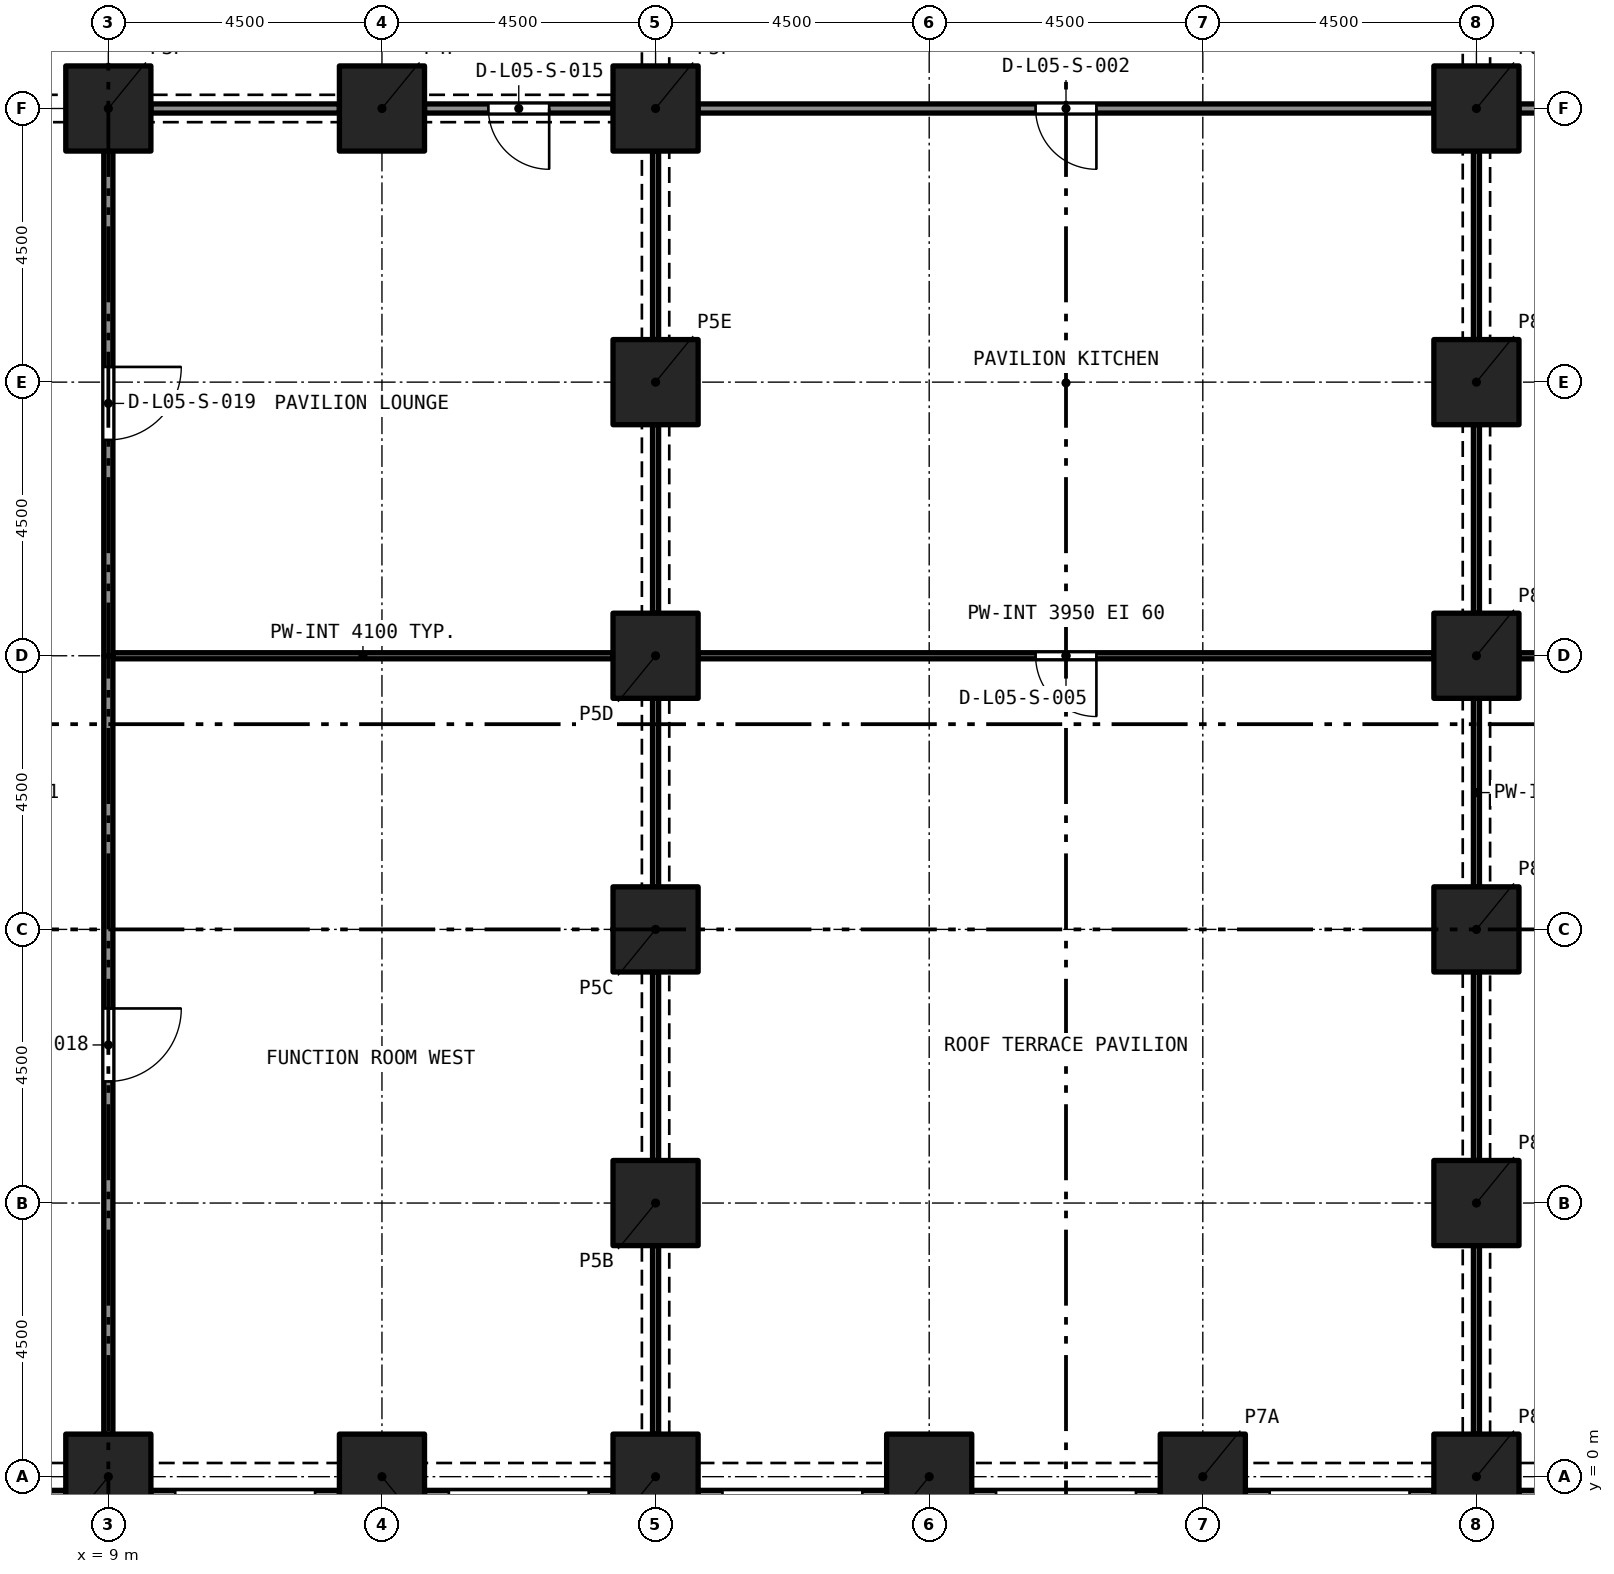
"""IFC4 building model, lengths in metres.
Left out: names, types, materials, properties, quantities, classifications, styles, units other than length and angle.
Written with IfcOpenShell. Run it as: python <this file> out.ifc"""

import sys

from ifc_helpers import new_model, si_unit, direction, frame, frame_2d, origin, origin_2d, place, context, subcontext, project, spatial, rectangle, extrude, element, fill, save


model = new_model("IFC4")
c1 = context("Model", 3, precision=1e-05, world=origin(), true_north=direction((0.0, 1.0)))
c2 = subcontext(c1, "Body", "Model", "MODEL_VIEW")
j1 = project(units=[si_unit("LENGTHUNIT", "METRE"), si_unit("PLANEANGLEUNIT", "RADIAN")], contexts=[c1])
p1 = place(None, origin())
s1 = spatial("IfcSite", under=j1, at=p1, CompositionType="ELEMENT")
p2 = place(p1, origin())
s2 = spatial("IfcBuilding", under=s1, at=p2, CompositionType="ELEMENT")
p3 = place(p2, frame((0.0, 0.0, 26.0)))
s3 = spatial("IfcBuildingStorey", under=s2, at=p3, CompositionType="ELEMENT", Elevation=26.0)
for number, where, z_axis, x_axis in (
    (1, (9.0, 0.0, 0.0), (0.0, 0.0, 1.0), (1.0, 0.0, 0.0)),
    (2, (13.5, 0.0, 0.0), (0.0, 0.0, 1.0), (1.0, 0.0, 0.0)),
    (3, (18.0, 0.0, 0.0), (0.0, 0.0, 1.0), (1.0, 0.0, 0.0)),
    (4, (22.5, 0.0, 0.0), (0.0, 0.0, 1.0), (1.0, 0.0, 0.0)),
    (5, (27.0, 0.0, 0.0), (0.0, 0.0, 1.0), (1.0, 0.0, 0.0)),
    (6, (31.5, 0.0, 0.0), (0.0, 0.0, 1.0), (1.0, 0.0, 0.0)),
    (7, (18.0, 4.5, 0.0), (0.0, 0.0, 1.0), (1.0, 0.0, 0.0)),
    (8, (31.5, 4.5, 0.0), (0.0, 0.0, 1.0), (1.0, 0.0, 0.0)),
    (9, (18.0, 9.0, 0.0), (0.0, 0.0, 1.0), (1.0, 0.0, 0.0)),
    (10, (31.5, 9.0, 0.0), (0.0, 0.0, 1.0), (1.0, 0.0, 0.0)),
    (11, (18.0, 13.5, 0.0), (0.0, 0.0, 1.0), (1.0, 0.0, 0.0)),
    (12, (31.5, 13.5, 0.0), (0.0, 0.0, 1.0), (1.0, 0.0, 0.0)),
    (13, (18.0, 18.0, 0.0), (0.0, 0.0, 1.0), (1.0, 0.0, 0.0)),
    (14, (31.5, 18.0, 0.0), (0.0, 0.0, 1.0), (1.0, 0.0, 0.0)),
    (15, (9.0, 22.5, 0.0), (0.0, 0.0, 1.0), (1.0, 0.0, 0.0)),
    (16, (13.5, 22.5, 0.0), (0.0, 0.0, 1.0), (1.0, 0.0, 0.0)),
    (17, (18.0, 22.5, 0.0), (0.0, 0.0, 1.0), (1.0, 0.0, 0.0)),
    (18, (31.5, 22.5, 0.0), (0.0, 0.0, 1.0), (1.0, 0.0, 0.0)),
):
    element("IfcColumn", number, at=place(p3, frame(where, z_axis=z_axis, x_axis=x_axis)), inside=s3, PredefinedType="COLUMN", context=c2, shape_type="SweptSolid", body=[
        extrude(rectangle(XDim=1.4, YDim=1.4, at=origin_2d()), origin(), (0.0, 0.0, 1.0), 4.4),
    ])
p4 = place(p3, frame((8.3, -0.375, 0.0), z_axis=(0.0, 0.0, 1.0), x_axis=(-1.0, 0.0, 0.0)))
e19 = element("IfcWall", 19, at=p4, inside=s3, PredefinedType="SOLIDWALL", context=c2, shape_type="SweptSolid", body=[
    extrude(rectangle(XDim=3.1, YDim=0.3, at=frame_2d((1.55, 0.0))), origin(), (0.0, 0.0, 1.0), 4.4),
])
p5 = place(p4, frame((0.4, 0.0, 0.45)))
e20 = element("IfcOpeningElement", 20, at=p5, cuts=e19, PredefinedType="OPENING", context=c2, shape_type="SweptSolid", body=[
    extrude(rectangle(XDim=2.3, YDim=2.55, at=frame_2d((1.15, 1.275))), frame((0.0, 0.16, 0.0), z_axis=(0.0, -1.0, 0.0), x_axis=(1.0, 0.0, 0.0)), (0.0, 0.0, 1.0), 0.32),
])
p6 = place(p3, frame((12.8, -0.375, 0.0), z_axis=(0.0, 0.0, 1.0), x_axis=(-1.0, 0.0, 0.0)))
e21 = element("IfcWall", 21, at=p6, inside=s3, PredefinedType="SOLIDWALL", context=c2, shape_type="SweptSolid", body=[
    extrude(rectangle(XDim=3.1, YDim=0.3, at=frame_2d((1.55, 0.0))), origin(), (0.0, 0.0, 1.0), 4.4),
])
p7 = place(p6, frame((0.4, 0.0, 0.45)))
e22 = element("IfcOpeningElement", 22, at=p7, cuts=e21, PredefinedType="OPENING", context=c2, shape_type="SweptSolid", body=[
    extrude(rectangle(XDim=2.3, YDim=2.55, at=frame_2d((1.15, 1.275))), frame((0.0, 0.16, 0.0), z_axis=(0.0, -1.0, 0.0), x_axis=(1.0, 0.0, 0.0)), (0.0, 0.0, 1.0), 0.32),
])
p8 = place(p3, frame((17.3, -0.375, 0.0), z_axis=(0.0, 0.0, 1.0), x_axis=(-1.0, 0.0, 0.0)))
e23 = element("IfcWall", 23, at=p8, inside=s3, PredefinedType="SOLIDWALL", context=c2, shape_type="SweptSolid", body=[
    extrude(rectangle(XDim=3.1, YDim=0.3, at=frame_2d((1.55, 0.0))), origin(), (0.0, 0.0, 1.0), 4.4),
])
p9 = place(p8, frame((0.4, 0.0, 0.45)))
e24 = element("IfcOpeningElement", 24, at=p9, cuts=e23, PredefinedType="OPENING", context=c2, shape_type="SweptSolid", body=[
    extrude(rectangle(XDim=2.3, YDim=2.55, at=frame_2d((1.15, 1.275))), frame((0.0, 0.16, 0.0), z_axis=(0.0, -1.0, 0.0), x_axis=(1.0, 0.0, 0.0)), (0.0, 0.0, 1.0), 0.32),
])
p10 = place(p3, frame((21.8, -0.375, 0.0), z_axis=(0.0, 0.0, 1.0), x_axis=(-1.0, 0.0, 0.0)))
e25 = element("IfcWall", 25, at=p10, inside=s3, PredefinedType="SOLIDWALL", context=c2, shape_type="SweptSolid", body=[
    extrude(rectangle(XDim=3.1, YDim=0.3, at=frame_2d((1.55, 0.0))), origin(), (0.0, 0.0, 1.0), 4.4),
])
p11 = place(p10, frame((0.4, 0.0, 0.45)))
e26 = element("IfcOpeningElement", 26, at=p11, cuts=e25, PredefinedType="OPENING", context=c2, shape_type="SweptSolid", body=[
    extrude(rectangle(XDim=2.3, YDim=2.55, at=frame_2d((1.15, 1.275))), frame((0.0, 0.16, 0.0), z_axis=(0.0, -1.0, 0.0), x_axis=(1.0, 0.0, 0.0)), (0.0, 0.0, 1.0), 0.32),
])
p12 = place(p3, frame((26.3, -0.375, 0.0), z_axis=(0.0, 0.0, 1.0), x_axis=(-1.0, 0.0, 0.0)))
e27 = element("IfcWall", 27, at=p12, inside=s3, PredefinedType="SOLIDWALL", context=c2, shape_type="SweptSolid", body=[
    extrude(rectangle(XDim=3.1, YDim=0.3, at=frame_2d((1.55, 0.0))), origin(), (0.0, 0.0, 1.0), 4.4),
])
p13 = place(p12, frame((0.4, 0.0, 0.45)))
e28 = element("IfcOpeningElement", 28, at=p13, cuts=e27, PredefinedType="OPENING", context=c2, shape_type="SweptSolid", body=[
    extrude(rectangle(XDim=2.3, YDim=2.55, at=frame_2d((1.15, 1.275))), frame((0.0, 0.16, 0.0), z_axis=(0.0, -1.0, 0.0), x_axis=(1.0, 0.0, 0.0)), (0.0, 0.0, 1.0), 0.32),
])
p14 = place(p3, frame((30.8, -0.375, 0.0), z_axis=(0.0, 0.0, 1.0), x_axis=(-1.0, 0.0, 0.0)))
e29 = element("IfcWall", 29, at=p14, inside=s3, PredefinedType="SOLIDWALL", context=c2, shape_type="SweptSolid", body=[
    extrude(rectangle(XDim=3.1, YDim=0.3, at=frame_2d((1.55, 0.0))), origin(), (0.0, 0.0, 1.0), 4.4),
])
p15 = place(p14, frame((0.4, 0.0, 0.45)))
e30 = element("IfcOpeningElement", 30, at=p15, cuts=e29, PredefinedType="OPENING", context=c2, shape_type="SweptSolid", body=[
    extrude(rectangle(XDim=2.3, YDim=2.55, at=frame_2d((1.15, 1.275))), frame((0.0, 0.16, 0.0), z_axis=(0.0, -1.0, 0.0), x_axis=(1.0, 0.0, 0.0)), (0.0, 0.0, 1.0), 0.32),
])
p16 = place(p3, frame((35.3, -0.375, 0.0), z_axis=(0.0, 0.0, 1.0), x_axis=(-1.0, 0.0, 0.0)))
e31 = element("IfcWall", 31, at=p16, inside=s3, PredefinedType="SOLIDWALL", context=c2, shape_type="SweptSolid", body=[
    extrude(rectangle(XDim=3.1, YDim=0.3, at=frame_2d((1.55, 0.0))), origin(), (0.0, 0.0, 1.0), 4.4),
])
p17 = place(p16, frame((0.4, 0.0, 0.45)))
e32 = element("IfcOpeningElement", 32, at=p17, cuts=e31, PredefinedType="OPENING", context=c2, shape_type="SweptSolid", body=[
    extrude(rectangle(XDim=2.3, YDim=2.55, at=frame_2d((1.15, 1.275))), frame((0.0, 0.16, 0.0), z_axis=(0.0, -1.0, 0.0), x_axis=(1.0, 0.0, 0.0)), (0.0, 0.0, 1.0), 0.32),
])
p18 = place(p3, frame((30.8, 22.5, 0.0), z_axis=(0.0, 0.0, 1.0), x_axis=(-1.0, 0.0, 0.0)))
e33 = element("IfcWall", 33, at=p18, inside=s3, PredefinedType="PARTITIONING", context=c2, shape_type="SweptSolid", body=[
    extrude(rectangle(XDim=12.1, YDim=0.15, at=frame_2d((6.05, 0.0))), origin(), (0.0, 0.0, 1.0), 3.95),
])
p19 = place(p18, frame((5.55, 0.0, 0.0)))
e34 = element("IfcOpeningElement", 34, at=p19, cuts=e33, PredefinedType="OPENING", context=c2, shape_type="SweptSolid", body=[
    extrude(rectangle(XDim=1.0, YDim=2.1, at=frame_2d((0.5, 1.05))), frame((0.0, 0.085, 0.0), z_axis=(0.0, -1.0, 0.0), x_axis=(1.0, 0.0, 0.0)), (0.0, 0.0, 1.0), 0.17),
])
p20 = place(p3, frame((30.8, 13.5, 0.0), z_axis=(0.0, 0.0, 1.0), x_axis=(-1.0, 0.0, 0.0)))
e35 = element("IfcWall", 35, at=p20, inside=s3, PredefinedType="PARTITIONING", context=c2, shape_type="SweptSolid", body=[
    extrude(rectangle(XDim=12.1, YDim=0.1, at=frame_2d((6.05, 0.0))), origin(), (0.0, 0.0, 1.0), 3.95),
])
p21 = place(p20, frame((5.55, 0.0, 0.0)))
e36 = element("IfcOpeningElement", 36, at=p21, cuts=e35, PredefinedType="OPENING", context=c2, shape_type="SweptSolid", body=[
    extrude(rectangle(XDim=1.0, YDim=2.1, at=frame_2d((0.5, 1.05))), frame((0.0, 0.06, 0.0), z_axis=(0.0, -1.0, 0.0), x_axis=(1.0, 0.0, 0.0)), (0.0, 0.0, 1.0), 0.12),
])
for number, where, z_axis, x_axis in (
    (37, (31.5, 9.7, 0.0), (0.0, 0.0, 1.0), (0.0, 1.0, 0.0)),
    (38, (31.5, 5.2, 0.0), (0.0, 0.0, 1.0), (0.0, 1.0, 0.0)),
    (39, (31.5, 0.7, 0.0), (0.0, 0.0, 1.0), (0.0, 1.0, 0.0)),
    (40, (18.0, 0.7, 0.0), (0.0, 0.0, 1.0), (0.0, 1.0, 0.0)),
    (41, (18.0, 5.2, 0.0), (0.0, 0.0, 1.0), (0.0, 1.0, 0.0)),
    (42, (18.0, 9.7, 0.0), (0.0, 0.0, 1.0), (0.0, 1.0, 0.0)),
    (43, (31.5, 18.7, 0.0), (0.0, 0.0, 1.0), (0.0, 1.0, 0.0)),
    (44, (31.5, 14.2, 0.0), (0.0, 0.0, 1.0), (0.0, 1.0, 0.0)),
    (45, (18.0, 14.2, 0.0), (0.0, 0.0, 1.0), (0.0, 1.0, 0.0)),
    (46, (18.0, 18.7, 0.0), (0.0, 0.0, 1.0), (0.0, 1.0, 0.0)),
):
    element("IfcWall", number, at=place(p3, frame(where, z_axis=z_axis, x_axis=x_axis)), inside=s3, PredefinedType="PARTITIONING", context=c2, shape_type="SweptSolid", body=[
        extrude(rectangle(XDim=3.1, YDim=0.1, at=frame_2d((1.55, 0.0))), origin(), (0.0, 0.0, 1.0), 3.58),
    ])
p22 = place(p3, frame((40.575, 22.5, 0.0), z_axis=(0.0, 0.0, 1.0), x_axis=(-1.0, 0.0, 0.0)))
e47 = element("IfcWall", 47, at=p22, inside=s3, PredefinedType="PARTITIONING", context=c2, shape_type="SweptSolid", body=[
    extrude(rectangle(XDim=8.375, YDim=0.15, at=frame_2d((4.188, 0.0))), origin(), (0.0, 0.0, 1.0), 4.1),
])
p23 = place(p22, frame((3.725, 0.0, 0.0)))
e48 = element("IfcOpeningElement", 48, at=p23, cuts=e47, PredefinedType="OPENING", context=c2, shape_type="SweptSolid", body=[
    extrude(rectangle(XDim=1.0, YDim=2.1, at=frame_2d((0.5, 1.05))), frame((0.0, 0.085, 0.0), z_axis=(0.0, -1.0, 0.0), x_axis=(1.0, 0.0, 0.0)), (0.0, 0.0, 1.0), 0.17),
])
p24 = place(p3, frame((32.2, 13.5, 0.0), z_axis=(0.0, 0.0, 1.0), x_axis=(1.0, 0.0, 0.0)))
e49 = element("IfcWall", 49, at=p24, inside=s3, PredefinedType="PARTITIONING", context=c2, shape_type="SweptSolid", body=[
    extrude(rectangle(XDim=8.225, YDim=0.1, at=frame_2d((4.113, 0.0))), origin(), (0.0, 0.0, 1.0), 4.1),
])
p25 = place(p3, frame((17.3, 22.5, 0.0), z_axis=(0.0, 0.0, 1.0), x_axis=(-1.0, 0.0, 0.0)))
e50 = element("IfcWall", 50, at=p25, inside=s3, PredefinedType="PARTITIONING", context=c2, shape_type="SweptSolid", body=[
    extrude(rectangle(XDim=3.1, YDim=0.15, at=frame_2d((1.55, 0.0))), origin(), (0.0, 0.0, 1.0), 3.58),
])
p26 = place(p25, frame((1.05, 0.0, 0.0)))
e51 = element("IfcOpeningElement", 51, at=p26, cuts=e50, PredefinedType="OPENING", context=c2, shape_type="SweptSolid", body=[
    extrude(rectangle(XDim=1.0, YDim=2.1, at=frame_2d((0.5, 1.05))), frame((0.0, 0.085, 0.0), z_axis=(0.0, -1.0, 0.0), x_axis=(1.0, 0.0, 0.0)), (0.0, 0.0, 1.0), 0.17),
])
p27 = place(p3, frame((9.7, 22.5, 0.0), z_axis=(0.0, 0.0, 1.0), x_axis=(1.0, 0.0, 0.0)))
e52 = element("IfcWall", 52, at=p27, inside=s3, PredefinedType="PARTITIONING", context=c2, shape_type="SweptSolid", body=[
    extrude(rectangle(XDim=3.1, YDim=0.15, at=frame_2d((1.55, 0.0))), origin(), (0.0, 0.0, 1.0), 3.58),
])
p28 = place(p3, frame((9.075, 13.5, 0.0), z_axis=(0.0, 0.0, 1.0), x_axis=(1.0, 0.0, 0.0)))
e53 = element("IfcWall", 53, at=p28, inside=s3, PredefinedType="PARTITIONING", context=c2, shape_type="SweptSolid", body=[
    extrude(rectangle(XDim=8.225, YDim=0.1, at=frame_2d((4.113, 0.0))), origin(), (0.0, 0.0, 1.0), 4.1),
])
p29 = place(p3, frame((9.0, 13.5, 0.0), z_axis=(0.0, 0.0, 1.0), x_axis=(0.0, -1.0, 0.0)))
e54 = element("IfcWall", 54, at=p29, inside=s3, PredefinedType="PARTITIONING", context=c2, shape_type="SweptSolid", body=[
    extrude(rectangle(XDim=12.8, YDim=0.15, at=frame_2d((6.4, 0.0))), origin(), (0.0, 0.0, 1.0), 4.1),
])
p30 = place(p29, frame((5.8, 0.0, 0.0)))
e55 = element("IfcOpeningElement", 55, at=p30, cuts=e54, PredefinedType="OPENING", context=c2, shape_type="SweptSolid", body=[
    extrude(rectangle(XDim=1.2, YDim=2.1, at=frame_2d((0.6, 1.05))), frame((0.0, 0.085, 0.0), z_axis=(0.0, -1.0, 0.0), x_axis=(1.0, 0.0, 0.0)), (0.0, 0.0, 1.0), 0.17),
])
p31 = place(p3, frame((9.0, 21.8, 0.0), z_axis=(0.0, 0.0, 1.0), x_axis=(0.0, -1.0, 0.0)))
e56 = element("IfcWall", 56, at=p31, inside=s3, PredefinedType="PARTITIONING", context=c2, shape_type="SweptSolid", body=[
    extrude(rectangle(XDim=8.3, YDim=0.15, at=frame_2d((4.15, 0.0))), origin(), (0.0, 0.0, 1.0), 4.1),
])
p32 = place(p31, frame((3.55, 0.0, 0.0)))
e57 = element("IfcOpeningElement", 57, at=p32, cuts=e56, PredefinedType="OPENING", context=c2, shape_type="SweptSolid", body=[
    extrude(rectangle(XDim=1.2, YDim=2.1, at=frame_2d((0.6, 1.05))), frame((0.0, 0.085, 0.0), z_axis=(0.0, -1.0, 0.0), x_axis=(1.0, 0.0, 0.0)), (0.0, 0.0, 1.0), 0.17),
])
p33 = place(p19, origin())
e58 = element("IfcDoor", 58, at=p33, inside=s3, OperationType="SINGLE_SWING_RIGHT", PredefinedType="DOOR", context=c2, shape_type="SweptSolid", body=[
    extrude(rectangle(XDim=1.0, YDim=2.1, at=frame_2d((0.5, 1.05))), frame((0.0, 0.025, 0.0), z_axis=(0.0, -1.0, 0.0), x_axis=(1.0, 0.0, 0.0)), (0.0, 0.0, 1.0), 0.05),
])
fill(e34, e58)
p34 = place(p21, origin())
e59 = element("IfcDoor", 59, at=p34, inside=s3, OperationType="SINGLE_SWING_RIGHT", PredefinedType="DOOR", context=c2, shape_type="SweptSolid", body=[
    extrude(rectangle(XDim=1.0, YDim=2.1, at=frame_2d((0.5, 1.05))), frame((0.0, 0.025, 0.0), z_axis=(0.0, -1.0, 0.0), x_axis=(1.0, 0.0, 0.0)), (0.0, 0.0, 1.0), 0.05),
])
fill(e36, e59)
p35 = place(p26, origin())
e60 = element("IfcDoor", 60, at=p35, inside=s3, OperationType="SINGLE_SWING_RIGHT", PredefinedType="DOOR", context=c2, shape_type="SweptSolid", body=[
    extrude(rectangle(XDim=1.0, YDim=2.1, at=frame_2d((0.5, 1.05))), frame((0.0, 0.025, 0.0), z_axis=(0.0, -1.0, 0.0), x_axis=(1.0, 0.0, 0.0)), (0.0, 0.0, 1.0), 0.05),
])
fill(e51, e60)
p36 = place(p30, origin())
e61 = element("IfcDoor", 61, at=p36, inside=s3, OperationType="SINGLE_SWING_RIGHT", PredefinedType="DOOR", context=c2, shape_type="SweptSolid", body=[
    extrude(rectangle(XDim=1.2, YDim=2.1, at=frame_2d((0.6, 1.05))), frame((0.0, 0.025, 0.0), z_axis=(0.0, -1.0, 0.0), x_axis=(1.0, 0.0, 0.0)), (0.0, 0.0, 1.0), 0.05),
])
fill(e55, e61)
p37 = place(p32, origin())
e62 = element("IfcDoor", 62, at=p37, inside=s3, OperationType="SINGLE_SWING_RIGHT", PredefinedType="DOOR", context=c2, shape_type="SweptSolid", body=[
    extrude(rectangle(XDim=1.2, YDim=2.1, at=frame_2d((0.6, 1.05))), frame((0.0, 0.025, 0.0), z_axis=(0.0, -1.0, 0.0), x_axis=(1.0, 0.0, 0.0)), (0.0, 0.0, 1.0), 0.05),
])
fill(e57, e62)
save(model, sys.argv[1])
